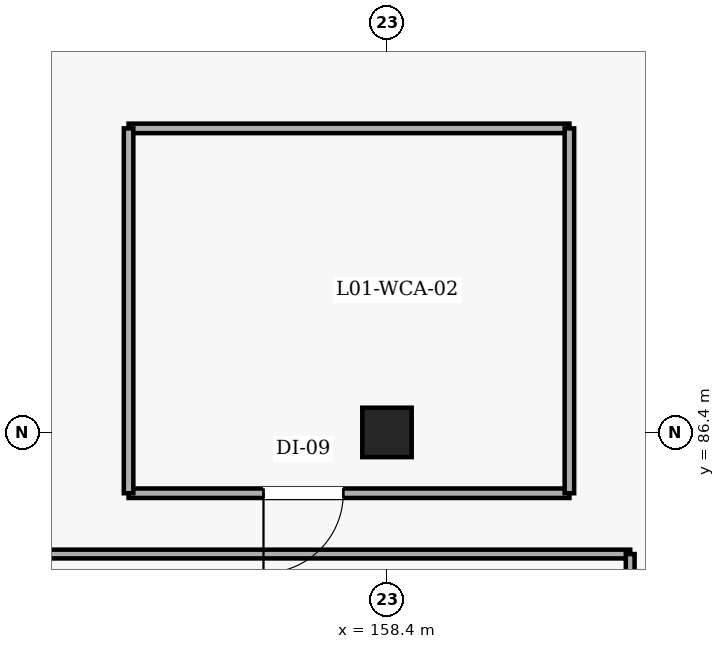
"""IFC4 building model, lengths in metres.
Left out: names, types, materials, properties, quantities, classifications, styles, units other than length and angle.
Written with IfcOpenShell. Run it as: python <this file> out.ifc"""

import sys

from ifc_helpers import new_model, si_unit, direction, frame, frame_2d, origin, origin_2d, place, context, subcontext, project, spatial, rectangle, extrude, element, fill, save


model = new_model("IFC4")
c1 = context("Model", 3, precision=1e-05, world=origin(), true_north=direction((0.0, 1.0)))
c2 = subcontext(c1, "Body", "Model", "MODEL_VIEW")
j1 = project(units=[si_unit("LENGTHUNIT", "METRE"), si_unit("PLANEANGLEUNIT", "RADIAN")], contexts=[c1])
p1 = place(None, origin())
s1 = spatial("IfcSite", under=j1, at=p1, CompositionType="ELEMENT")
p2 = place(p1, origin())
s2 = spatial("IfcBuilding", under=s1, at=p2, CompositionType="ELEMENT")
p3 = place(p2, frame((0.0, 0.0, 5.4)))
s3 = spatial("IfcBuildingStorey", under=s2, at=p3, CompositionType="ELEMENT", Elevation=5.4)
p4 = place(p3, frame((158.4, 86.4, 0.0), z_axis=(0.0, 0.0, 1.0), x_axis=(1.0, 0.0, 0.0)))
e1 = element("IfcColumn", 1, at=p4, inside=s3, PredefinedType="COLUMN", context=c2, shape_type="SweptSolid", body=[
    extrude(rectangle(XDim=0.65, YDim=0.65, at=origin_2d()), origin(), (0.0, 0.0, 1.0), 3.9),
])
p5 = place(p3, frame((137.8, 84.8, 0.0), z_axis=(0.0, 0.0, 1.0), x_axis=(1.0, 0.0, 0.0)))
e2 = element("IfcWall", 2, at=p5, inside=s3, PredefinedType="PARTITIONING", context=c2, shape_type="SweptSolid", body=[
    extrude(rectangle(XDim=23.8, YDim=0.115, at=frame_2d((11.9, 0.0))), origin(), (0.0, 0.0, 1.0), 3.5),
])
p6 = place(p3, frame((161.6, 84.8, 0.0), z_axis=(0.0, 0.0, 1.0), x_axis=(0.0, -1.0, 0.0)))
e3 = element("IfcWall", 3, at=p6, inside=s3, PredefinedType="PARTITIONING", context=c2, shape_type="SweptSolid", body=[
    extrude(rectangle(XDim=12.0, YDim=0.115, at=frame_2d((6.0, 0.0))), origin(), (0.0, 0.0, 1.0), 3.4),
])
p7 = place(p6, frame((4.95, 0.0, 0.0)))
e4 = element("IfcOpeningElement", 4, at=p7, cuts=e3, PredefinedType="OPENING", context=c2, shape_type="SweptSolid", body=[
    extrude(rectangle(XDim=2.1, YDim=2.3, at=frame_2d((1.05, 1.15))), frame((0.0, 0.067, 0.0), z_axis=(0.0, -1.0, 0.0), x_axis=(1.0, 0.0, 0.0)), (0.0, 0.0, 1.0), 0.135),
])
p8 = place(p3, frame((155.0, 90.4, 0.0), z_axis=(0.0, 0.0, 1.0), x_axis=(1.0, 0.0, 0.0)))
e5 = element("IfcWall", 5, at=p8, inside=s3, PredefinedType="PARTITIONING", context=c2, shape_type="SweptSolid", body=[
    extrude(rectangle(XDim=5.8, YDim=0.125, at=frame_2d((2.9, 0.0))), origin(), (0.0, 0.0, 1.0), 3.5),
])
p9 = place(p3, frame((160.8, 85.6, 0.0), z_axis=(0.0, 0.0, 1.0), x_axis=(-1.0, 0.0, 0.0)))
e6 = element("IfcWall", 6, at=p9, inside=s3, PredefinedType="PARTITIONING", context=c2, shape_type="SweptSolid", body=[
    extrude(rectangle(XDim=5.8, YDim=0.125, at=frame_2d((2.9, 0.0))), origin(), (0.0, 0.0, 1.0), 3.5),
])
p10 = place(p9, frame((2.975, 0.0, 0.0)))
e7 = element("IfcOpeningElement", 7, at=p10, cuts=e6, PredefinedType="OPENING", context=c2, shape_type="SweptSolid", body=[
    extrude(rectangle(XDim=1.05, YDim=2.1, at=frame_2d((0.525, 1.05))), frame((0.0, 0.073, 0.0), z_axis=(0.0, -1.0, 0.0), x_axis=(1.0, 0.0, 0.0)), (0.0, 0.0, 1.0), 0.145),
])
for number, where, z_axis, x_axis in (
    (8, (160.8, 90.4, 0.0), (0.0, 0.0, 1.0), (0.0, -1.0, 0.0)),
    (9, (155.0, 85.6, 0.0), (0.0, 0.0, 1.0), (0.0, 1.0, 0.0)),
):
    element("IfcWall", number, at=place(p3, frame(where, z_axis=z_axis, x_axis=x_axis)), inside=s3, PredefinedType="PARTITIONING", context=c2, shape_type="SweptSolid", body=[
        extrude(rectangle(XDim=4.8, YDim=0.125, at=frame_2d((2.4, 0.0))), origin(), (0.0, 0.0, 1.0), 3.4),
    ])
p11 = place(p10, origin())
e10 = element("IfcDoor", 10, at=p11, inside=s3, OperationType="SINGLE_SWING_RIGHT", PredefinedType="DOOR", context=c2, shape_type="SweptSolid", body=[
    extrude(rectangle(XDim=1.05, YDim=2.1, at=frame_2d((0.525, 1.05))), frame((0.0, 0.025, 0.0), z_axis=(0.0, -1.0, 0.0), x_axis=(1.0, 0.0, 0.0)), (0.0, 0.0, 1.0), 0.05),
])
fill(e7, e10)
save(model, sys.argv[1])
